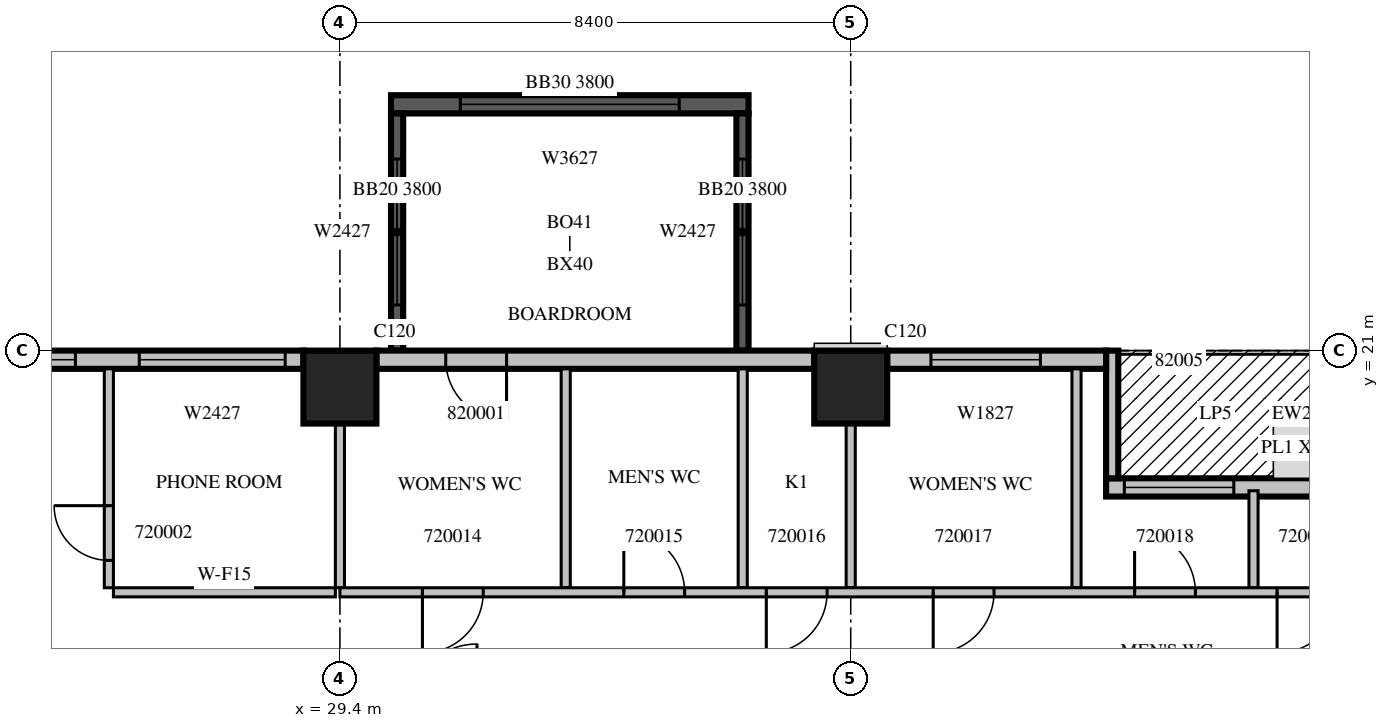
"""IFC4 building model, lengths in metres.
Left out: names, types, materials, properties, quantities, classifications, styles, units other than length and angle.
Written with IfcOpenShell. Run it as: python <this file> out.ifc"""

import sys

from ifc_helpers import new_model, si_unit, direction, frame, frame_2d, origin, origin_2d, place, context, subcontext, project, spatial, rectangle, extrude, source, transform, mapped, element, fill, save


model = new_model("IFC4")
c1 = context("Model", 3, precision=1e-05, world=origin(), true_north=direction((0.0, 1.0)))
c2 = subcontext(c1, "Body", "Model", "MODEL_VIEW")
j1 = project(units=[si_unit("LENGTHUNIT", "METRE"), si_unit("PLANEANGLEUNIT", "RADIAN")], contexts=[c1])
p1 = place(None, origin())
s1 = spatial("IfcSite", under=j1, at=p1, CompositionType="ELEMENT")
p2 = place(p1, origin())
s2 = spatial("IfcBuilding", under=s1, at=p2, CompositionType="ELEMENT")
p3 = place(p2, frame((0.0, 0.0, 95.1)))
s3 = spatial("IfcBuildingStorey", under=s2, at=p3, CompositionType="ELEMENT", Elevation=95.1)
m1 = source(origin(), c2, "Body", "SweptSolid", [
    extrude(rectangle(XDim=1.2, YDim=1.2, at=origin_2d()), origin(), (0.0, 0.0, 1.0), 4.2),
])
for number, where, z_axis, x_axis in (
    (1, (29.4, 20.4, 0.0), (0.0, 0.0, 1.0), (1.0, 0.0, 0.0)),
    (2, (37.8, 20.4, 0.0), (0.0, 0.0, 1.0), (1.0, 0.0, 0.0)),
):
    element("IfcColumn", number, at=place(p3, frame(where, z_axis=z_axis, x_axis=x_axis)), inside=s3, PredefinedType="COLUMN", context=c2, shape_type="MappedRepresentation", body=[
        mapped(m1, transform((0.0, 0.0, 0.0), scale=1.0)),
    ])
m2 = source(origin(), c2, "Body", "SweptSolid", [
    extrude(rectangle(XDim=5.88, YDim=0.3, at=frame_2d((2.94, 0.0))), origin(), (0.0, 0.0, 1.0), 3.8),
])
p4 = place(p3, frame((36.12, 25.05, 0.0), z_axis=(0.0, 0.0, 1.0), x_axis=(-1.0, 0.0, 0.0)))
e3 = element("IfcWall", 3, at=p4, inside=s3, PredefinedType="SOLIDWALL", context=c2, shape_type="MappedRepresentation", body=[
    mapped(m2, transform((0.0, 0.0, 0.0), scale=1.0)),
])
m3 = source(origin(), c2, "Body", "SweptSolid", [
    extrude(rectangle(XDim=3.6, YDim=2.7, at=frame_2d((1.8, 1.35))), frame((0.0, 0.16, 0.0), z_axis=(0.0, -1.0, 0.0), x_axis=(1.0, 0.0, 0.0)), (0.0, 0.0, 1.0), 0.32),
])
p5 = place(p4, frame((1.14, 0.0, 0.6)))
e4 = element("IfcOpeningElement", 4, at=p5, cuts=e3, PredefinedType="OPENING", context=c2, shape_type="MappedRepresentation", body=[
    mapped(m3, transform((0.0, 0.0, 0.0), scale=1.0)),
])
m4 = source(origin(), c2, "Body", "SweptSolid", [
    extrude(rectangle(XDim=3.9, YDim=0.2, at=frame_2d((1.95, 0.0))), origin(), (0.0, 0.0, 1.0), 3.8),
])
p6 = place(p3, frame((36.02, 21.0, 0.0), z_axis=(0.0, 0.0, 1.0), x_axis=(0.0, 1.0, 0.0)))
e5 = element("IfcWall", 5, at=p6, inside=s3, PredefinedType="SOLIDWALL", context=c2, shape_type="MappedRepresentation", body=[
    mapped(m4, transform((0.0, 0.0, 0.0), scale=1.0)),
])
m5 = source(origin(), c2, "Body", "SweptSolid", [
    extrude(rectangle(XDim=2.4, YDim=2.7, at=frame_2d((1.2, 1.35))), frame((0.0, 0.11, 0.0), z_axis=(0.0, -1.0, 0.0), x_axis=(1.0, 0.0, 0.0)), (0.0, 0.0, 1.0), 0.22),
])
p7 = place(p6, frame((0.75, 0.0, 0.6)))
e6 = element("IfcOpeningElement", 6, at=p7, cuts=e5, PredefinedType="OPENING", context=c2, shape_type="MappedRepresentation", body=[
    mapped(m5, transform((0.0, 0.0, 0.0), scale=1.0)),
])
p8 = place(p3, frame((30.34, 21.0, 0.0), z_axis=(0.0, 0.0, 1.0), x_axis=(0.0, 1.0, 0.0)))
e7 = element("IfcWall", 7, at=p8, inside=s3, PredefinedType="SOLIDWALL", context=c2, shape_type="MappedRepresentation", body=[
    mapped(m4, transform((0.0, 0.0, 0.0), scale=1.0)),
])
p9 = place(p8, frame((0.75, 0.0, 0.6)))
e8 = element("IfcOpeningElement", 8, at=p9, cuts=e7, PredefinedType="OPENING", context=c2, shape_type="MappedRepresentation", body=[
    mapped(m5, transform((0.0, 0.0, 0.0), scale=1.0)),
])
m6 = source(origin(), c2, "Body", "SweptSolid", [
    extrude(rectangle(XDim=3.6, YDim=0.3, at=frame_2d((1.8, 0.0))), origin(), (0.0, 0.0, 1.0), 3.8),
])
p10 = place(p3, frame((45.6, 18.75, 0.0), z_axis=(0.0, 0.0, 1.0), x_axis=(-1.0, 0.0, 0.0)))
e9 = element("IfcWall", 9, at=p10, inside=s3, PredefinedType="STANDARD", context=c2, shape_type="MappedRepresentation", body=[
    mapped(m6, transform((0.0, 0.0, 0.0), scale=1.0)),
])
m7 = source(origin(), c2, "Body", "SweptSolid", [
    extrude(rectangle(XDim=1.8, YDim=2.4, at=frame_2d((0.9, 1.2))), frame((0.0, 0.16, 0.0), z_axis=(0.0, -1.0, 0.0), x_axis=(1.0, 0.0, 0.0)), (0.0, 0.0, 1.0), 0.32),
])
p11 = place(p10, frame((1.5, 0.0, 0.0)))
e10 = element("IfcOpeningElement", 10, at=p11, cuts=e9, PredefinedType="OPENING", context=c2, shape_type="MappedRepresentation", body=[
    mapped(m7, transform((0.0, 0.0, 0.0), scale=1.0)),
])
m8 = source(origin(), c2, "Body", "SweptSolid", [
    extrude(rectangle(XDim=2.1, YDim=0.2, at=frame_2d((1.05, 0.0))), origin(), (0.0, 0.0, 1.0), 3.8),
])
p12 = place(p3, frame((42.1, 21.0, 0.0), z_axis=(0.0, 0.0, 1.0), x_axis=(0.0, -1.0, 0.0)))
e11 = element("IfcWall", 11, at=p12, inside=s3, PredefinedType="STANDARD", context=c2, shape_type="MappedRepresentation", body=[
    mapped(m8, transform((0.0, 0.0, 0.0), scale=1.0)),
])
p13 = place(p3, frame((42.0, 20.85, 0.0), z_axis=(0.0, 0.0, 1.0), x_axis=(-1.0, 0.0, 0.0)))
e12 = element("IfcWall", 12, at=p13, inside=s3, PredefinedType="STANDARD", context=c2, shape_type="MappedRepresentation", body=[
    mapped(m6, transform((0.0, 0.0, 0.0), scale=1.0)),
])
m9 = source(origin(), c2, "Body", "SweptSolid", [
    extrude(rectangle(XDim=1.8, YDim=2.7, at=frame_2d((0.9, 1.35))), frame((0.0, 0.16, 0.0), z_axis=(0.0, -1.0, 0.0), x_axis=(1.0, 0.0, 0.0)), (0.0, 0.0, 1.0), 0.32),
])
p14 = place(p13, frame((1.081, 0.0, 0.6)))
e13 = element("IfcOpeningElement", 13, at=p14, cuts=e12, PredefinedType="OPENING", context=c2, shape_type="MappedRepresentation", body=[
    mapped(m9, transform((0.0, 0.0, 0.0), scale=1.0)),
])
m10 = source(origin(), c2, "Body", "SweptSolid", [
    extrude(rectangle(XDim=7.2, YDim=0.3, at=frame_2d((3.6, 0.0))), origin(), (0.0, 0.0, 1.0), 3.8),
])
p15 = place(p3, frame((37.2, 20.85, 0.0), z_axis=(0.0, 0.0, 1.0), x_axis=(-1.0, 0.0, 0.0)))
e14 = element("IfcWall", 14, at=p15, inside=s3, PredefinedType="STANDARD", context=c2, shape_type="MappedRepresentation", body=[
    mapped(m10, transform((0.0, 0.0, 0.0), scale=1.0)),
])
m11 = source(origin(), c2, "Body", "SweptSolid", [
    extrude(rectangle(XDim=1.0, YDim=2.1, at=frame_2d((0.5, 1.05))), frame((0.0, 0.16, 0.0), z_axis=(0.0, -1.0, 0.0), x_axis=(1.0, 0.0, 0.0)), (0.0, 0.0, 1.0), 0.32),
])
p16 = place(p15, frame((5.06, 0.0, 0.0)))
e15 = element("IfcOpeningElement", 15, at=p16, cuts=e14, PredefinedType="OPENING", context=c2, shape_type="MappedRepresentation", body=[
    mapped(m11, transform((0.0, 0.0, 0.0), scale=1.0)),
])
m12 = source(origin(), c2, "Body", "SweptSolid", [
    extrude(rectangle(XDim=6.6, YDim=0.3, at=frame_2d((3.3, 0.0))), origin(), (0.0, 0.0, 1.0), 3.8),
])
p17 = place(p3, frame((28.8, 20.85, 0.0), z_axis=(0.0, 0.0, 1.0), x_axis=(-1.0, 0.0, 0.0)))
e16 = element("IfcWall", 16, at=p17, inside=s3, PredefinedType="STANDARD", context=c2, shape_type="MappedRepresentation", body=[
    mapped(m12, transform((0.0, 0.0, 0.0), scale=1.0)),
])
m13 = source(origin(), c2, "Body", "SweptSolid", [
    extrude(rectangle(XDim=2.4, YDim=2.7, at=frame_2d((1.2, 1.35))), frame((0.0, 0.16, 0.0), z_axis=(0.0, -1.0, 0.0), x_axis=(1.0, 0.0, 0.0)), (0.0, 0.0, 1.0), 0.32),
])
p18 = place(p17, frame((0.3, 0.0, 0.6)))
e17 = element("IfcOpeningElement", 17, at=p18, cuts=e16, PredefinedType="OPENING", context=c2, shape_type="MappedRepresentation", body=[
    mapped(m13, transform((0.0, 0.0, 0.0), scale=1.0)),
])
p19 = place(p17, frame((3.75, 0.0, 0.6)))
e18 = element("IfcOpeningElement", 18, at=p19, cuts=e16, PredefinedType="OPENING", context=c2, shape_type="MappedRepresentation", body=[
    mapped(m9, transform((0.0, 0.0, 0.0), scale=1.0)),
])
m14 = source(origin(), c2, "Body", "SweptSolid", [
    extrude(rectangle(XDim=3.6, YDim=0.15, at=frame_2d((1.8, 0.0))), origin(), (0.0, 0.0, 1.0), 3.8),
])
p20 = place(p3, frame((25.6, 20.7, 0.0), z_axis=(0.0, 0.0, 1.0), x_axis=(0.0, -1.0, 0.0)))
e19 = element("IfcWall", 19, at=p20, inside=s3, PredefinedType="PARTITIONING", context=c2, shape_type="MappedRepresentation", body=[
    mapped(m14, transform((0.0, 0.0, 0.0), scale=1.0)),
])
m15 = source(origin(), c2, "Body", "SweptSolid", [
    extrude(rectangle(XDim=0.9, YDim=2.1, at=frame_2d((0.45, 1.05))), frame((0.0, 0.085, 0.0), z_axis=(0.0, -1.0, 0.0), x_axis=(1.0, 0.0, 0.0)), (0.0, 0.0, 1.0), 0.17),
])
p21 = place(p20, frame((2.25, 0.0, 0.0)))
e20 = element("IfcOpeningElement", 20, at=p21, cuts=e19, PredefinedType="OPENING", context=c2, shape_type="MappedRepresentation", body=[
    mapped(m15, transform((0.0, 0.0, 0.0), scale=1.0)),
])
m16 = source(origin(), c2, "Body", "SweptSolid", [
    extrude(rectangle(XDim=3.65, YDim=0.15, at=frame_2d((1.825, 0.0))), origin(), (0.0, 0.0, 1.0), 3.8),
])
p22 = place(p3, frame((25.675, 17.025, 0.0), z_axis=(0.0, 0.0, 1.0), x_axis=(1.0, 0.0, 0.0)))
e21 = element("IfcWall", 21, at=p22, inside=s3, PredefinedType="PARTITIONING", context=c2, shape_type="MappedRepresentation", body=[
    mapped(m16, transform((0.0, 0.0, 0.0), scale=1.0)),
])
m17 = source(origin(), c2, "Body", "SweptSolid", [
    extrude(rectangle(XDim=2.701, YDim=0.15, at=frame_2d((1.351, 0.0))), origin(), (0.0, 0.0, 1.0), 3.8),
])
p23 = place(p3, frame((29.4, 17.1, 0.0), z_axis=(0.0, 0.0, 1.0), x_axis=(0.0, 1.0, 0.0)))
e22 = element("IfcWall", 22, at=p23, inside=s3, PredefinedType="PARTITIONING", context=c2, shape_type="MappedRepresentation", body=[
    mapped(m17, transform((0.0, 0.0, 0.0), scale=1.0)),
])
for number, where, z_axis, x_axis in (
    (23, (33.113, 20.7, 0.0), (0.0, 0.0, 1.0), (0.0, -1.0, 0.0)),
    (24, (36.024, 20.7, 0.0), (0.0, 0.0, 1.0), (0.0, -1.0, 0.0)),
    (25, (41.513, 20.7, 0.0), (0.0, 0.0, 1.0), (0.0, -1.0, 0.0)),
):
    element("IfcWall", number, at=place(p3, frame(where, z_axis=z_axis, x_axis=x_axis)), inside=s3, PredefinedType="PARTITIONING", context=c2, shape_type="MappedRepresentation", body=[
        mapped(m14, transform((0.0, 0.0, 0.0), scale=1.0)),
    ])
m18 = source(origin(), c2, "Body", "SweptSolid", [
    extrude(rectangle(XDim=1.595, YDim=0.15, at=frame_2d((0.797, 0.0))), origin(), (0.0, 0.0, 1.0), 3.8),
])
p24 = place(p3, frame((44.424, 18.695, 0.0), z_axis=(0.0, 0.0, 1.0), x_axis=(0.0, -1.0, 0.0)))
e26 = element("IfcWall", 26, at=p24, inside=s3, PredefinedType="PARTITIONING", context=c2, shape_type="MappedRepresentation", body=[
    mapped(m18, transform((0.0, 0.0, 0.0), scale=1.0)),
])
p25 = place(p3, frame((37.8, 17.1, 0.0), z_axis=(0.0, 0.0, 1.0), x_axis=(0.0, 1.0, 0.0)))
e27 = element("IfcWall", 27, at=p25, inside=s3, PredefinedType="PARTITIONING", context=c2, shape_type="MappedRepresentation", body=[
    mapped(m17, transform((0.0, 0.0, 0.0), scale=1.0)),
])
m19 = source(origin(), c2, "Body", "SweptSolid", [
    extrude(rectangle(XDim=37.5, YDim=0.15, at=frame_2d((18.75, 0.0))), origin(), (0.0, 0.0, 1.0), 3.8),
])
p26 = place(p3, frame((29.4, 17.025, 0.0), z_axis=(0.0, 0.0, 1.0), x_axis=(1.0, 0.0, 0.0)))
e28 = element("IfcWall", 28, at=p26, inside=s3, PredefinedType="PARTITIONING", context=c2, shape_type="MappedRepresentation", body=[
    mapped(m19, transform((0.0, 0.0, 0.0), scale=1.0)),
])
m20 = source(origin(), c2, "Body", "SweptSolid", [
    extrude(rectangle(XDim=1.0, YDim=2.1, at=frame_2d((0.5, 1.05))), frame((0.0, 0.085, 0.0), z_axis=(0.0, -1.0, 0.0), x_axis=(1.0, 0.0, 0.0)), (0.0, 0.0, 1.0), 0.17),
])
p27 = place(p26, frame((1.357, 0.0, 0.0)))
e29 = element("IfcOpeningElement", 29, at=p27, cuts=e28, PredefinedType="OPENING", context=c2, shape_type="MappedRepresentation", body=[
    mapped(m20, transform((0.0, 0.0, 0.0), scale=1.0)),
])
p28 = place(p26, frame((4.669, 0.0, 0.0)))
e30 = element("IfcOpeningElement", 30, at=p28, cuts=e28, PredefinedType="OPENING", context=c2, shape_type="MappedRepresentation", body=[
    mapped(m20, transform((0.0, 0.0, 0.0), scale=1.0)),
])
p29 = place(p26, frame((7.012, 0.0, 0.0)))
e31 = element("IfcOpeningElement", 31, at=p29, cuts=e28, PredefinedType="OPENING", context=c2, shape_type="MappedRepresentation", body=[
    mapped(m20, transform((0.0, 0.0, 0.0), scale=1.0)),
])
p30 = place(p26, frame((9.757, 0.0, 0.0)))
e32 = element("IfcOpeningElement", 32, at=p30, cuts=e28, PredefinedType="OPENING", context=c2, shape_type="MappedRepresentation", body=[
    mapped(m20, transform((0.0, 0.0, 0.0), scale=1.0)),
])
p31 = place(p26, frame((13.069, 0.0, 0.0)))
e33 = element("IfcOpeningElement", 33, at=p31, cuts=e28, PredefinedType="OPENING", context=c2, shape_type="MappedRepresentation", body=[
    mapped(m20, transform((0.0, 0.0, 0.0), scale=1.0)),
])
p32 = place(p26, frame((15.412, 0.0, 0.0)))
e34 = element("IfcOpeningElement", 34, at=p32, cuts=e28, PredefinedType="OPENING", context=c2, shape_type="MappedRepresentation", body=[
    mapped(m20, transform((0.0, 0.0, 0.0), scale=1.0)),
])
m21 = source(origin(), c2, "Body", "SweptSolid", [
    extrude(rectangle(XDim=1.2, YDim=2.1, at=frame_2d((0.6, 1.05))), frame((0.0, 0.085, 0.0), z_axis=(0.0, -1.0, 0.0), x_axis=(1.0, 0.0, 0.0)), (0.0, 0.0, 1.0), 0.17),
])
p33 = place(p26, frame((19.14, 0.0, 0.0)))
e35 = element("IfcOpeningElement", 35, at=p33, cuts=e28, PredefinedType="OPENING", context=c2, shape_type="MappedRepresentation", body=[
    mapped(m21, transform((0.0, 0.0, 0.0), scale=1.0)),
])
p34 = place(p26, frame((25.02, 0.0, 0.0)))
e36 = element("IfcOpeningElement", 36, at=p34, cuts=e28, PredefinedType="OPENING", context=c2, shape_type="MappedRepresentation", body=[
    mapped(m21, transform((0.0, 0.0, 0.0), scale=1.0)),
])
p35 = place(p26, frame((30.364, 0.0, 0.0)))
e37 = element("IfcOpeningElement", 37, at=p35, cuts=e28, PredefinedType="OPENING", context=c2, shape_type="MappedRepresentation", body=[
    mapped(m15, transform((0.0, 0.0, 0.0), scale=1.0)),
])
p36 = place(p26, frame((34.871, 0.0, 0.0)))
e38 = element("IfcOpeningElement", 38, at=p36, cuts=e28, PredefinedType="OPENING", context=c2, shape_type="MappedRepresentation", body=[
    mapped(m15, transform((0.0, 0.0, 0.0), scale=1.0)),
])
m22 = source(origin(), c2, "Body", "SweptSolid", [
    extrude(rectangle(XDim=3.6, YDim=2.7, at=frame_2d((1.8, 1.35))), frame((0.0, 0.03, 0.0), z_axis=(0.0, -1.0, 0.0), x_axis=(1.0, 0.0, 0.0)), (0.0, 0.0, 1.0), 0.06),
])
p37 = place(p5, origin())
e39 = element("IfcWindow", 39, at=p37, inside=s3, PartitioningType="SINGLE_PANEL", PredefinedType="WINDOW", context=c2, shape_type="MappedRepresentation", body=[
    mapped(m22, transform((0.0, 0.0, 0.0), scale=1.0)),
])
fill(e4, e39)
m23 = source(origin(), c2, "Body", "SweptSolid", [
    extrude(rectangle(XDim=2.4, YDim=2.7, at=frame_2d((1.2, 1.35))), frame((0.0, 0.03, 0.0), z_axis=(0.0, -1.0, 0.0), x_axis=(1.0, 0.0, 0.0)), (0.0, 0.0, 1.0), 0.06),
])
p38 = place(p7, origin())
e40 = element("IfcWindow", 40, at=p38, inside=s3, PartitioningType="SINGLE_PANEL", PredefinedType="WINDOW", context=c2, shape_type="MappedRepresentation", body=[
    mapped(m23, transform((0.0, 0.0, 0.0), scale=1.0)),
])
fill(e6, e40)
p39 = place(p9, origin())
e41 = element("IfcWindow", 41, at=p39, inside=s3, PartitioningType="SINGLE_PANEL", PredefinedType="WINDOW", context=c2, shape_type="MappedRepresentation", body=[
    mapped(m23, transform((0.0, 0.0, 0.0), scale=1.0)),
])
fill(e8, e41)
m24 = source(origin(), c2, "Body", "SweptSolid", [
    extrude(rectangle(XDim=1.8, YDim=2.4, at=frame_2d((0.9, 1.2))), frame((0.0, 0.025, 0.0), z_axis=(0.0, -1.0, 0.0), x_axis=(1.0, 0.0, 0.0)), (0.0, 0.0, 1.0), 0.05),
])
p40 = place(p11, origin())
e42 = element("IfcDoor", 42, at=p40, inside=s3, OperationType="SLIDING_TO_LEFT", PredefinedType="DOOR", context=c2, shape_type="MappedRepresentation", body=[
    mapped(m24, transform((0.0, 0.0, 0.0), scale=1.0)),
])
fill(e10, e42)
p41 = place(p18, origin())
e43 = element("IfcWindow", 43, at=p41, inside=s3, PartitioningType="SINGLE_PANEL", PredefinedType="WINDOW", context=c2, shape_type="MappedRepresentation", body=[
    mapped(m23, transform((0.0, 0.0, 0.0), scale=1.0)),
])
fill(e17, e43)
m25 = source(origin(), c2, "Body", "SweptSolid", [
    extrude(rectangle(XDim=1.8, YDim=2.7, at=frame_2d((0.9, 1.35))), frame((0.0, 0.03, 0.0), z_axis=(0.0, -1.0, 0.0), x_axis=(1.0, 0.0, 0.0)), (0.0, 0.0, 1.0), 0.06),
])
p42 = place(p19, origin())
e44 = element("IfcWindow", 44, at=p42, inside=s3, PartitioningType="SINGLE_PANEL", PredefinedType="WINDOW", context=c2, shape_type="MappedRepresentation", body=[
    mapped(m25, transform((0.0, 0.0, 0.0), scale=1.0)),
])
fill(e18, e44)
p43 = place(p14, origin())
e45 = element("IfcWindow", 45, at=p43, inside=s3, PartitioningType="SINGLE_PANEL", PredefinedType="WINDOW", context=c2, shape_type="MappedRepresentation", body=[
    mapped(m25, transform((0.0, 0.0, 0.0), scale=1.0)),
])
fill(e13, e45)
m26 = source(origin(), c2, "Body", "SweptSolid", [
    extrude(rectangle(XDim=0.9, YDim=2.1, at=frame_2d((0.45, 1.05))), frame((0.0, 0.025, 0.0), z_axis=(0.0, -1.0, 0.0), x_axis=(1.0, 0.0, 0.0)), (0.0, 0.0, 1.0), 0.05),
])
p44 = place(p21, origin())
e46 = element("IfcDoor", 46, at=p44, inside=s3, OperationType="SINGLE_SWING_RIGHT", PredefinedType="DOOR", context=c2, shape_type="MappedRepresentation", body=[
    mapped(m26, transform((0.0, 0.0, 0.0), scale=1.0)),
])
fill(e20, e46)
m27 = source(origin(), c2, "Body", "SweptSolid", [
    extrude(rectangle(XDim=1.0, YDim=2.1, at=frame_2d((0.5, 1.05))), frame((0.0, 0.025, 0.0), z_axis=(0.0, -1.0, 0.0), x_axis=(1.0, 0.0, 0.0)), (0.0, 0.0, 1.0), 0.05),
])
p45 = place(p27, origin())
e47 = element("IfcDoor", 47, at=p45, inside=s3, OperationType="SINGLE_SWING_RIGHT", PredefinedType="DOOR", context=c2, shape_type="MappedRepresentation", body=[
    mapped(m27, transform((0.0, 0.0, 0.0), scale=1.0)),
])
fill(e29, e47)
p46 = place(p28, origin())
e48 = element("IfcDoor", 48, at=p46, inside=s3, OperationType="SINGLE_SWING_LEFT", PredefinedType="DOOR", context=c2, shape_type="MappedRepresentation", body=[
    mapped(m27, transform((0.0, 0.0, 0.0), scale=1.0)),
])
fill(e30, e48)
p47 = place(p29, origin())
e49 = element("IfcDoor", 49, at=p47, inside=s3, OperationType="SINGLE_SWING_RIGHT", PredefinedType="DOOR", context=c2, shape_type="MappedRepresentation", body=[
    mapped(m27, transform((0.0, 0.0, 0.0), scale=1.0)),
])
fill(e31, e49)
p48 = place(p30, origin())
e50 = element("IfcDoor", 50, at=p48, inside=s3, OperationType="SINGLE_SWING_RIGHT", PredefinedType="DOOR", context=c2, shape_type="MappedRepresentation", body=[
    mapped(m27, transform((0.0, 0.0, 0.0), scale=1.0)),
])
fill(e32, e50)
p49 = place(p31, origin())
e51 = element("IfcDoor", 51, at=p49, inside=s3, OperationType="SINGLE_SWING_LEFT", PredefinedType="DOOR", context=c2, shape_type="MappedRepresentation", body=[
    mapped(m27, transform((0.0, 0.0, 0.0), scale=1.0)),
])
fill(e33, e51)
p50 = place(p32, origin())
e52 = element("IfcDoor", 52, at=p50, inside=s3, OperationType="SINGLE_SWING_RIGHT", PredefinedType="DOOR", context=c2, shape_type="MappedRepresentation", body=[
    mapped(m27, transform((0.0, 0.0, 0.0), scale=1.0)),
])
fill(e34, e52)
p51 = place(p16, origin())
e53 = element("IfcDoor", 53, at=p51, inside=s3, OperationType="SINGLE_SWING_LEFT", PredefinedType="DOOR", context=c2, shape_type="MappedRepresentation", body=[
    mapped(m27, transform((0.0, 0.0, 0.0), scale=1.0)),
])
fill(e15, e53)
save(model, sys.argv[1])
